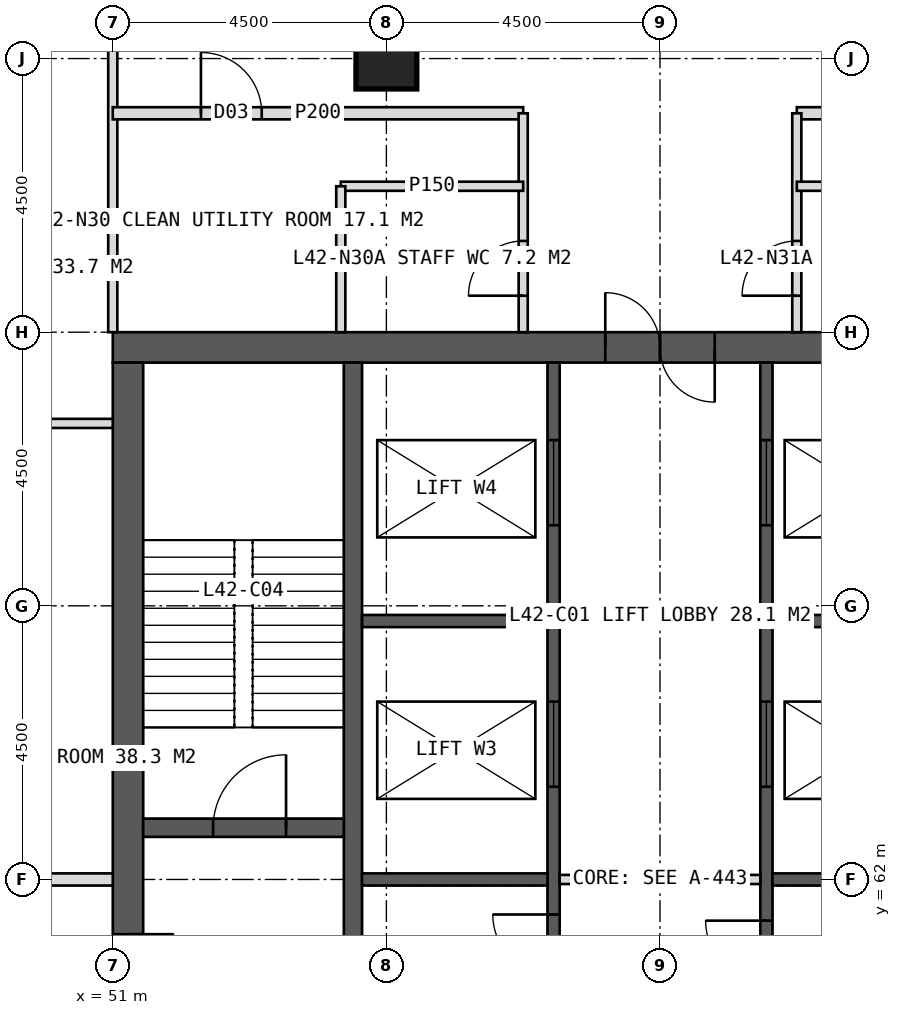
"""IFC4 building model, lengths in metres.
Left out: names, types, materials, properties, quantities, classifications, styles, units other than length and angle.
Written with IfcOpenShell. Run it as: python <this file> out.ifc"""

import sys

from ifc_helpers import new_model, si_unit, direction, frame, frame_2d, origin, origin_2d, place, context, subcontext, project, spatial, rectangle, hollow_rectangle, extrude, element, fill, save


model = new_model("IFC4")
c1 = context("Model", 3, precision=1e-05, world=origin(), true_north=direction((0.0, 1.0)))
c2 = subcontext(c1, "Body", "Model", "MODEL_VIEW")
j1 = project(units=[si_unit("LENGTHUNIT", "METRE"), si_unit("PLANEANGLEUNIT", "RADIAN")], contexts=[c1])
p1 = place(None, origin())
s1 = spatial("IfcSite", under=j1, at=p1, CompositionType="ELEMENT")
p2 = place(p1, origin())
s2 = spatial("IfcBuilding", under=s1, at=p2, CompositionType="ELEMENT")
p3 = place(p2, frame((0.0, 0.0, 177.0)))
s3 = spatial("IfcBuildingStorey", under=s2, at=p3, CompositionType="ELEMENT", Elevation=177.0)
p4 = place(p3, frame((51.0, 70.75, 0.0), z_axis=(0.0, 0.0, 1.0), x_axis=(1.0, 0.0, 0.0)))
e1 = element("IfcWall", 1, at=p4, inside=s3, PredefinedType="SHEAR", context=c2, shape_type="SweptSolid", body=[
    extrude(rectangle(XDim=18.0, YDim=0.5, at=frame_2d((9.0, 0.0))), origin(), (0.0, 0.0, 1.0), 4.0),
])
p5 = place(p4, frame((8.1, 0.0, 0.0)))
e2 = element("IfcOpeningElement", 2, at=p5, cuts=e1, PredefinedType="OPENING", context=c2, shape_type="SweptSolid", body=[
    extrude(rectangle(XDim=1.8, YDim=2.2, at=frame_2d((0.9, 1.1))), frame((0.0, 0.26, 0.0), z_axis=(0.0, -1.0, 0.0), x_axis=(1.0, 0.0, 0.0)), (0.0, 0.0, 1.0), 0.52),
])
p6 = place(p3, frame((51.25, 53.5, 0.0), z_axis=(0.0, 0.0, 1.0), x_axis=(0.0, 1.0, 0.0)))
e3 = element("IfcWall", 3, at=p6, inside=s3, PredefinedType="SHEAR", context=c2, shape_type="SweptSolid", body=[
    extrude(rectangle(XDim=17.0, YDim=0.5, at=frame_2d((8.5, 0.0))), origin(), (0.0, 0.0, 1.0), 4.0),
])
p7 = place(p6, frame((6.1, 0.0, 0.0)))
e4 = element("IfcOpeningElement", 4, at=p7, cuts=e3, PredefinedType="OPENING", context=c2, shape_type="SweptSolid", body=[
    extrude(rectangle(XDim=1.5, YDim=2.2, at=frame_2d((0.75, 1.1))), frame((0.0, 0.26, 0.0), z_axis=(0.0, -1.0, 0.0), x_axis=(1.0, 0.0, 0.0)), (0.0, 0.0, 1.0), 0.52),
])
p8 = place(p3, frame((54.95, 53.5, 0.0), z_axis=(0.0, 0.0, 1.0), x_axis=(0.0, 1.0, 0.0)))
e5 = element("IfcWall", 5, at=p8, inside=s3, PredefinedType="SHEAR", context=c2, shape_type="SweptSolid", body=[
    extrude(rectangle(XDim=17.0, YDim=0.3, at=frame_2d((8.5, 0.0))), origin(), (0.0, 0.0, 1.0), 4.0),
])
p9 = place(p3, frame((58.25, 53.5, 0.0), z_axis=(0.0, 0.0, 1.0), x_axis=(0.0, 1.0, 0.0)))
e6 = element("IfcWall", 6, at=p9, inside=s3, PredefinedType="SHEAR", context=c2, shape_type="SweptSolid", body=[
    extrude(rectangle(XDim=17.0, YDim=0.2, at=frame_2d((8.5, 0.0))), origin(), (0.0, 0.0, 1.0), 4.0),
])
p10 = place(p9, frame((0.6, 0.0, 0.0)))
e7 = element("IfcOpeningElement", 7, at=p10, cuts=e6, PredefinedType="OPENING", context=c2, shape_type="SweptSolid", body=[
    extrude(rectangle(XDim=1.0, YDim=2.1, at=frame_2d((0.5, 1.05))), frame((0.0, 0.11, 0.0), z_axis=(0.0, -1.0, 0.0), x_axis=(1.0, 0.0, 0.0)), (0.0, 0.0, 1.0), 0.22),
])
p11 = place(p9, frame((2.75, 0.0, 0.0)))
e8 = element("IfcOpeningElement", 8, at=p11, cuts=e6, PredefinedType="OPENING", context=c2, shape_type="SweptSolid", body=[
    extrude(rectangle(XDim=1.0, YDim=2.1, at=frame_2d((0.5, 1.05))), frame((0.0, 0.11, 0.0), z_axis=(0.0, -1.0, 0.0), x_axis=(1.0, 0.0, 0.0)), (0.0, 0.0, 1.0), 0.22),
])
p12 = place(p9, frame((4.824, 0.0, 0.0)))
e9 = element("IfcOpeningElement", 9, at=p12, cuts=e6, PredefinedType="OPENING", context=c2, shape_type="SweptSolid", body=[
    extrude(rectangle(XDim=1.0, YDim=2.1, at=frame_2d((0.5, 1.05))), frame((0.0, 0.11, 0.0), z_axis=(0.0, -1.0, 0.0), x_axis=(1.0, 0.0, 0.0)), (0.0, 0.0, 1.0), 0.22),
])
p13 = place(p9, frame((6.924, 0.0, 0.0)))
e10 = element("IfcOpeningElement", 10, at=p13, cuts=e6, PredefinedType="OPENING", context=c2, shape_type="SweptSolid", body=[
    extrude(rectangle(XDim=1.0, YDim=2.1, at=frame_2d((0.5, 1.05))), frame((0.0, 0.11, 0.0), z_axis=(0.0, -1.0, 0.0), x_axis=(1.0, 0.0, 0.0)), (0.0, 0.0, 1.0), 0.22),
])
p14 = place(p9, frame((10.025, 0.0, 0.0)))
e11 = element("IfcOpeningElement", 11, at=p14, cuts=e6, PredefinedType="OPENING", context=c2, shape_type="SweptSolid", body=[
    extrude(rectangle(XDim=1.4, YDim=2.2, at=frame_2d((0.7, 1.1))), frame((0.0, 0.11, 0.0), z_axis=(0.0, -1.0, 0.0), x_axis=(1.0, 0.0, 0.0)), (0.0, 0.0, 1.0), 0.22),
])
p15 = place(p9, frame((14.325, 0.0, 0.0)))
e12 = element("IfcOpeningElement", 12, at=p15, cuts=e6, PredefinedType="OPENING", context=c2, shape_type="SweptSolid", body=[
    extrude(rectangle(XDim=1.4, YDim=2.2, at=frame_2d((0.7, 1.1))), frame((0.0, 0.11, 0.0), z_axis=(0.0, -1.0, 0.0), x_axis=(1.0, 0.0, 0.0)), (0.0, 0.0, 1.0), 0.22),
])
p16 = place(p3, frame((61.75, 53.5, 0.0), z_axis=(0.0, 0.0, 1.0), x_axis=(0.0, 1.0, 0.0)))
e13 = element("IfcWall", 13, at=p16, inside=s3, PredefinedType="SHEAR", context=c2, shape_type="SweptSolid", body=[
    extrude(rectangle(XDim=17.0, YDim=0.2, at=frame_2d((8.5, 0.0))), origin(), (0.0, 0.0, 1.0), 4.0),
])
p17 = place(p16, frame((0.808, 0.0, 0.0)))
e14 = element("IfcOpeningElement", 14, at=p17, cuts=e13, PredefinedType="OPENING", context=c2, shape_type="SweptSolid", body=[
    extrude(rectangle(XDim=1.0, YDim=2.1, at=frame_2d((0.5, 1.05))), frame((0.0, 0.11, 0.0), z_axis=(0.0, -1.0, 0.0), x_axis=(1.0, 0.0, 0.0)), (0.0, 0.0, 1.0), 0.22),
])
p18 = place(p16, frame((2.958, 0.0, 0.0)))
e15 = element("IfcOpeningElement", 15, at=p18, cuts=e13, PredefinedType="OPENING", context=c2, shape_type="SweptSolid", body=[
    extrude(rectangle(XDim=1.0, YDim=2.1, at=frame_2d((0.5, 1.05))), frame((0.0, 0.11, 0.0), z_axis=(0.0, -1.0, 0.0), x_axis=(1.0, 0.0, 0.0)), (0.0, 0.0, 1.0), 0.22),
])
p19 = place(p16, frame((4.722, 0.0, 0.0)))
e16 = element("IfcOpeningElement", 16, at=p19, cuts=e13, PredefinedType="OPENING", context=c2, shape_type="SweptSolid", body=[
    extrude(rectangle(XDim=1.0, YDim=2.1, at=frame_2d((0.5, 1.05))), frame((0.0, 0.11, 0.0), z_axis=(0.0, -1.0, 0.0), x_axis=(1.0, 0.0, 0.0)), (0.0, 0.0, 1.0), 0.22),
])
p20 = place(p16, frame((6.823, 0.0, 0.0)))
e17 = element("IfcOpeningElement", 17, at=p20, cuts=e13, PredefinedType="OPENING", context=c2, shape_type="SweptSolid", body=[
    extrude(rectangle(XDim=1.0, YDim=2.1, at=frame_2d((0.5, 1.05))), frame((0.0, 0.11, 0.0), z_axis=(0.0, -1.0, 0.0), x_axis=(1.0, 0.0, 0.0)), (0.0, 0.0, 1.0), 0.22),
])
p21 = place(p16, frame((10.025, 0.0, 0.0)))
e18 = element("IfcOpeningElement", 18, at=p21, cuts=e13, PredefinedType="OPENING", context=c2, shape_type="SweptSolid", body=[
    extrude(rectangle(XDim=1.4, YDim=2.2, at=frame_2d((0.7, 1.1))), frame((0.0, 0.11, 0.0), z_axis=(0.0, -1.0, 0.0), x_axis=(1.0, 0.0, 0.0)), (0.0, 0.0, 1.0), 0.22),
])
p22 = place(p16, frame((14.325, 0.0, 0.0)))
e19 = element("IfcOpeningElement", 19, at=p22, cuts=e13, PredefinedType="OPENING", context=c2, shape_type="SweptSolid", body=[
    extrude(rectangle(XDim=1.4, YDim=2.2, at=frame_2d((0.7, 1.1))), frame((0.0, 0.11, 0.0), z_axis=(0.0, -1.0, 0.0), x_axis=(1.0, 0.0, 0.0)), (0.0, 0.0, 1.0), 0.22),
])
for number, where, z_axis, x_axis in (
    (20, (55.1, 62.0, 0.0), (0.0, 0.0, 1.0), (1.0, 0.0, 0.0)),
    (21, (61.85, 62.0, 0.0), (0.0, 0.0, 1.0), (1.0, 0.0, 0.0)),
    (22, (55.1, 66.25, 0.0), (0.0, 0.0, 1.0), (1.0, 0.0, 0.0)),
    (23, (61.85, 66.25, 0.0), (0.0, 0.0, 1.0), (1.0, 0.0, 0.0)),
):
    element("IfcWall", number, at=place(p3, frame(where, z_axis=z_axis, x_axis=x_axis)), inside=s3, PredefinedType="SHEAR", context=c2, shape_type="SweptSolid", body=[
        extrude(rectangle(XDim=3.05, YDim=0.2, at=frame_2d((1.525, 0.0))), origin(), (0.0, 0.0, 1.0), 4.0),
    ])
p23 = place(p3, frame((51.5, 62.85, 0.0), z_axis=(0.0, 0.0, 1.0), x_axis=(1.0, 0.0, 0.0)))
e24 = element("IfcWall", 24, at=p23, inside=s3, PredefinedType="SHEAR", context=c2, shape_type="SweptSolid", body=[
    extrude(rectangle(XDim=3.3, YDim=0.3, at=frame_2d((1.65, 0.0))), origin(), (0.0, 0.0, 1.0), 4.0),
])
p24 = place(p23, frame((1.15, 0.0, 0.0)))
e25 = element("IfcOpeningElement", 25, at=p24, cuts=e24, PredefinedType="OPENING", context=c2, shape_type="SweptSolid", body=[
    extrude(rectangle(XDim=1.2, YDim=2.1, at=frame_2d((0.6, 1.05))), frame((0.0, 0.16, 0.0), z_axis=(0.0, -1.0, 0.0), x_axis=(1.0, 0.0, 0.0)), (0.0, 0.0, 1.0), 0.32),
])
p25 = place(p3, frame((55.5, 75.5, 0.0), z_axis=(0.0, 0.0, 1.0), x_axis=(1.0, 0.0, 0.0)))
e26 = element("IfcColumn", 26, at=p25, inside=s3, PredefinedType="COLUMN", context=c2, shape_type="SweptSolid", body=[
    extrude(hollow_rectangle(XDim=1.0, YDim=1.0, WallThickness=0.1, at=origin_2d()), origin(), (0.0, 0.0, 1.0), 4.0),
])
p26 = place(p3, frame((51.0, 71.0, 0.0), z_axis=(0.0, 0.0, 1.0), x_axis=(0.0, 1.0, 0.0)))
e27 = element("IfcWall", 27, at=p26, inside=s3, PredefinedType="PARTITIONING", context=c2, shape_type="SweptSolid", body=[
    extrude(rectangle(XDim=5.1, YDim=0.15, at=frame_2d((2.55, 0.0))), origin(), (0.0, 0.0, 1.0), 3.75),
])
p27 = place(p3, frame((51.0, 74.6, 0.0), z_axis=(0.0, 0.0, 1.0), x_axis=(1.0, 0.0, 0.0)))
e28 = element("IfcWall", 28, at=p27, inside=s3, PredefinedType="PARTITIONING", context=c2, shape_type="SweptSolid", body=[
    extrude(rectangle(XDim=6.75, YDim=0.2, at=frame_2d((3.375, 0.0))), origin(), (0.0, 0.0, 1.0), 3.75),
])
p28 = place(p27, frame((1.45, 0.0, 0.0)))
e29 = element("IfcOpeningElement", 29, at=p28, cuts=e28, PredefinedType="OPENING", context=c2, shape_type="SweptSolid", body=[
    extrude(rectangle(XDim=1.0, YDim=2.1, at=frame_2d((0.5, 1.05))), frame((0.0, 0.11, 0.0), z_axis=(0.0, -1.0, 0.0), x_axis=(1.0, 0.0, 0.0)), (0.0, 0.0, 1.0), 0.22),
])
p29 = place(p3, frame((62.25, 74.6, 0.0), z_axis=(0.0, 0.0, 1.0), x_axis=(1.0, 0.0, 0.0)))
e30 = element("IfcWall", 30, at=p29, inside=s3, PredefinedType="PARTITIONING", context=c2, shape_type="SweptSolid", body=[
    extrude(rectangle(XDim=6.75, YDim=0.2, at=frame_2d((3.375, 0.0))), origin(), (0.0, 0.0, 1.0), 3.75),
])
p30 = place(p29, frame((3.55, 0.0, 0.0)))
e31 = element("IfcOpeningElement", 31, at=p30, cuts=e30, PredefinedType="OPENING", context=c2, shape_type="SweptSolid", body=[
    extrude(rectangle(XDim=1.0, YDim=2.1, at=frame_2d((0.5, 1.05))), frame((0.0, 0.11, 0.0), z_axis=(0.0, -1.0, 0.0), x_axis=(1.0, 0.0, 0.0)), (0.0, 0.0, 1.0), 0.22),
])
p31 = place(p3, frame((57.75, 71.0, 0.0), z_axis=(0.0, 0.0, 1.0), x_axis=(0.0, 1.0, 0.0)))
e32 = element("IfcWall", 32, at=p31, inside=s3, PredefinedType="PARTITIONING", context=c2, shape_type="SweptSolid", body=[
    extrude(rectangle(XDim=3.6, YDim=0.15, at=frame_2d((1.8, 0.0))), origin(), (0.0, 0.0, 1.0), 3.75),
])
p32 = place(p31, frame((0.6, 0.0, 0.0)))
e33 = element("IfcOpeningElement", 33, at=p32, cuts=e32, PredefinedType="OPENING", context=c2, shape_type="SweptSolid", body=[
    extrude(rectangle(XDim=0.9, YDim=2.1, at=frame_2d((0.45, 1.05))), frame((0.0, 0.085, 0.0), z_axis=(0.0, -1.0, 0.0), x_axis=(1.0, 0.0, 0.0)), (0.0, 0.0, 1.0), 0.17),
])
p33 = place(p3, frame((62.25, 71.0, 0.0), z_axis=(0.0, 0.0, 1.0), x_axis=(0.0, 1.0, 0.0)))
e34 = element("IfcWall", 34, at=p33, inside=s3, PredefinedType="PARTITIONING", context=c2, shape_type="SweptSolid", body=[
    extrude(rectangle(XDim=3.6, YDim=0.15, at=frame_2d((1.8, 0.0))), origin(), (0.0, 0.0, 1.0), 3.75),
])
p34 = place(p33, frame((0.6, 0.0, 0.0)))
e35 = element("IfcOpeningElement", 35, at=p34, cuts=e34, PredefinedType="OPENING", context=c2, shape_type="SweptSolid", body=[
    extrude(rectangle(XDim=0.9, YDim=2.1, at=frame_2d((0.45, 1.05))), frame((0.0, 0.085, 0.0), z_axis=(0.0, -1.0, 0.0), x_axis=(1.0, 0.0, 0.0)), (0.0, 0.0, 1.0), 0.17),
])
p35 = place(p3, frame((54.75, 73.4, 0.0), z_axis=(0.0, 0.0, 1.0), x_axis=(1.0, 0.0, 0.0)))
e36 = element("IfcWall", 36, at=p35, inside=s3, PredefinedType="PARTITIONING", context=c2, shape_type="SweptSolid", body=[
    extrude(rectangle(XDim=3.0, YDim=0.15, at=frame_2d((1.5, 0.0))), origin(), (0.0, 0.0, 1.0), 3.75),
])
p36 = place(p3, frame((54.75, 71.0, 0.0), z_axis=(0.0, 0.0, 1.0), x_axis=(0.0, 1.0, 0.0)))
e37 = element("IfcWall", 37, at=p36, inside=s3, PredefinedType="PARTITIONING", context=c2, shape_type="SweptSolid", body=[
    extrude(rectangle(XDim=2.4, YDim=0.15, at=frame_2d((1.2, 0.0))), origin(), (0.0, 0.0, 1.0), 3.75),
])
p37 = place(p3, frame((62.25, 73.4, 0.0), z_axis=(0.0, 0.0, 1.0), x_axis=(1.0, 0.0, 0.0)))
e38 = element("IfcWall", 38, at=p37, inside=s3, PredefinedType="PARTITIONING", context=c2, shape_type="SweptSolid", body=[
    extrude(rectangle(XDim=3.0, YDim=0.15, at=frame_2d((1.5, 0.0))), origin(), (0.0, 0.0, 1.0), 3.75),
])
p38 = place(p3, frame((51.0, 62.0, 0.0), z_axis=(0.0, 0.0, 1.0), x_axis=(-1.0, 0.0, 0.0)))
e39 = element("IfcWall", 39, at=p38, inside=s3, PredefinedType="SOLIDWALL", context=c2, shape_type="SweptSolid", body=[
    extrude(rectangle(XDim=5.1, YDim=0.2, at=frame_2d((2.55, 0.0))), origin(), (0.0, 0.0, 1.0), 2.95),
])
p39 = place(p3, frame((51.0, 69.5, 0.0), z_axis=(0.0, 0.0, 1.0), x_axis=(-1.0, 0.0, 0.0)))
e40 = element("IfcWall", 40, at=p39, inside=s3, PredefinedType="PARTITIONING", context=c2, shape_type="SweptSolid", body=[
    extrude(rectangle(XDim=5.1, YDim=0.15, at=frame_2d((2.55, 0.0))), origin(), (0.0, 0.0, 1.0), 3.75),
])
p40 = place(p3, frame((58.35, 62.0, 0.0), z_axis=(0.0, 0.0, 1.0), x_axis=(1.0, 0.0, 0.0)))
e41 = element("IfcWall", 41, at=p40, inside=s3, PredefinedType="PARTITIONING", context=c2, shape_type="SweptSolid", body=[
    extrude(rectangle(XDim=3.3, YDim=0.15, at=frame_2d((1.65, 0.0))), origin(), (0.0, 0.0, 1.0), 3.75),
])
p41 = place(p32, origin())
e42 = element("IfcDoor", 42, at=p41, inside=s3, OperationType="SINGLE_SWING_LEFT", PredefinedType="DOOR", context=c2, shape_type="SweptSolid", body=[
    extrude(rectangle(XDim=0.9, YDim=2.1, at=frame_2d((0.45, 1.05))), frame((0.0, 0.025, 0.0), z_axis=(0.0, -1.0, 0.0), x_axis=(1.0, 0.0, 0.0)), (0.0, 0.0, 1.0), 0.05),
])
fill(e33, e42)
p42 = place(p28, origin())
e43 = element("IfcDoor", 43, at=p42, inside=s3, OperationType="SINGLE_SWING_LEFT", PredefinedType="DOOR", context=c2, shape_type="SweptSolid", body=[
    extrude(rectangle(XDim=1.0, YDim=2.1, at=frame_2d((0.5, 1.05))), frame((0.0, 0.025, 0.0), z_axis=(0.0, -1.0, 0.0), x_axis=(1.0, 0.0, 0.0)), (0.0, 0.0, 1.0), 0.05),
])
fill(e29, e43)
p43 = place(p34, origin())
e44 = element("IfcDoor", 44, at=p43, inside=s3, OperationType="SINGLE_SWING_LEFT", PredefinedType="DOOR", context=c2, shape_type="SweptSolid", body=[
    extrude(rectangle(XDim=0.9, YDim=2.1, at=frame_2d((0.45, 1.05))), frame((0.0, 0.025, 0.0), z_axis=(0.0, -1.0, 0.0), x_axis=(1.0, 0.0, 0.0)), (0.0, 0.0, 1.0), 0.05),
])
fill(e35, e44)
p44 = place(p5, origin())
e45 = element("IfcDoor", 45, at=p44, inside=s3, OperationType="DOUBLE_DOOR_SINGLE_SWING", PredefinedType="DOOR", context=c2, shape_type="SweptSolid", body=[
    extrude(rectangle(XDim=1.8, YDim=2.2, at=frame_2d((0.9, 1.1))), frame((0.0, 0.025, 0.0), z_axis=(0.0, -1.0, 0.0), x_axis=(1.0, 0.0, 0.0)), (0.0, 0.0, 1.0), 0.05),
])
fill(e2, e45)
p45 = place(p7, origin())
e46 = element("IfcDoor", 46, at=p45, inside=s3, OperationType="DOUBLE_DOOR_SINGLE_SWING", PredefinedType="DOOR", context=c2, shape_type="SweptSolid", body=[
    extrude(rectangle(XDim=1.5, YDim=2.2, at=frame_2d((0.75, 1.1))), frame((0.0, 0.025, 0.0), z_axis=(0.0, -1.0, 0.0), x_axis=(1.0, 0.0, 0.0)), (0.0, 0.0, 1.0), 0.05),
])
fill(e4, e46)
p46 = place(p24, origin())
e47 = element("IfcDoor", 47, at=p46, inside=s3, OperationType="SINGLE_SWING_RIGHT", PredefinedType="DOOR", context=c2, shape_type="SweptSolid", body=[
    extrude(rectangle(XDim=1.2, YDim=2.1, at=frame_2d((0.6, 1.05))), frame((0.0, 0.025, 0.0), z_axis=(0.0, -1.0, 0.0), x_axis=(1.0, 0.0, 0.0)), (0.0, 0.0, 1.0), 0.05),
])
fill(e25, e47)
p47 = place(p13, origin())
e48 = element("IfcDoor", 48, at=p47, inside=s3, OperationType="SINGLE_SWING_RIGHT", PredefinedType="DOOR", context=c2, shape_type="SweptSolid", body=[
    extrude(rectangle(XDim=1.0, YDim=2.1, at=frame_2d((0.5, 1.05))), frame((0.0, 0.025, 0.0), z_axis=(0.0, -1.0, 0.0), x_axis=(1.0, 0.0, 0.0)), (0.0, 0.0, 1.0), 0.05),
])
fill(e10, e48)
p48 = place(p20, origin())
e49 = element("IfcDoor", 49, at=p48, inside=s3, OperationType="SINGLE_SWING_RIGHT", PredefinedType="DOOR", context=c2, shape_type="SweptSolid", body=[
    extrude(rectangle(XDim=1.0, YDim=2.1, at=frame_2d((0.5, 1.05))), frame((0.0, 0.025, 0.0), z_axis=(0.0, -1.0, 0.0), x_axis=(1.0, 0.0, 0.0)), (0.0, 0.0, 1.0), 0.05),
])
fill(e17, e49)
p49 = place(p14, origin())
e50 = element("IfcDoor", 50, at=p49, inside=s3, OperationType="SLIDING_TO_LEFT", PredefinedType="DOOR", context=c2, shape_type="SweptSolid", body=[
    extrude(rectangle(XDim=1.4, YDim=2.2, at=frame_2d((0.7, 1.1))), frame((0.0, 0.025, 0.0), z_axis=(0.0, -1.0, 0.0), x_axis=(1.0, 0.0, 0.0)), (0.0, 0.0, 1.0), 0.05),
])
fill(e11, e50)
p50 = place(p21, origin())
e51 = element("IfcDoor", 51, at=p50, inside=s3, OperationType="SLIDING_TO_LEFT", PredefinedType="DOOR", context=c2, shape_type="SweptSolid", body=[
    extrude(rectangle(XDim=1.4, YDim=2.2, at=frame_2d((0.7, 1.1))), frame((0.0, 0.025, 0.0), z_axis=(0.0, -1.0, 0.0), x_axis=(1.0, 0.0, 0.0)), (0.0, 0.0, 1.0), 0.05),
])
fill(e18, e51)
p51 = place(p15, origin())
e52 = element("IfcDoor", 52, at=p51, inside=s3, OperationType="SLIDING_TO_LEFT", PredefinedType="DOOR", context=c2, shape_type="SweptSolid", body=[
    extrude(rectangle(XDim=1.4, YDim=2.2, at=frame_2d((0.7, 1.1))), frame((0.0, 0.025, 0.0), z_axis=(0.0, -1.0, 0.0), x_axis=(1.0, 0.0, 0.0)), (0.0, 0.0, 1.0), 0.05),
])
fill(e12, e52)
p52 = place(p22, origin())
e53 = element("IfcDoor", 53, at=p52, inside=s3, OperationType="SLIDING_TO_LEFT", PredefinedType="DOOR", context=c2, shape_type="SweptSolid", body=[
    extrude(rectangle(XDim=1.4, YDim=2.2, at=frame_2d((0.7, 1.1))), frame((0.0, 0.025, 0.0), z_axis=(0.0, -1.0, 0.0), x_axis=(1.0, 0.0, 0.0)), (0.0, 0.0, 1.0), 0.05),
])
fill(e19, e53)
save(model, sys.argv[1])
